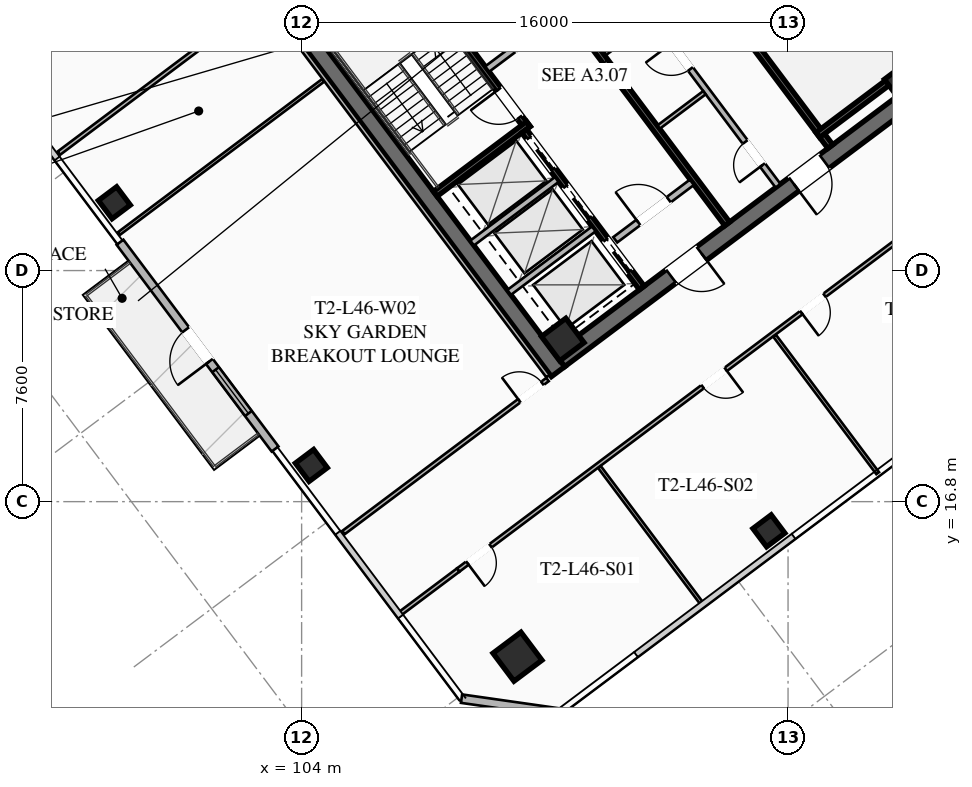
"""IFC4 building model, lengths in metres.
Left out: names, types, materials, properties, quantities, classifications, styles, units other than length and angle.
Written with IfcOpenShell. Run it as: python <this file> out.ifc"""

import sys

from ifc_helpers import new_model, si_unit, direction, frame, frame_2d, origin, origin_2d, place, context, subcontext, project, spatial, rectangle, hollow_rectangle, extrude, element, fill, save


model = new_model("IFC4")
c1 = context("Model", 3, precision=1e-05, world=origin(), true_north=direction((0.0, 1.0)))
c2 = subcontext(c1, "Body", "Model", "MODEL_VIEW")
j1 = project(units=[si_unit("LENGTHUNIT", "METRE"), si_unit("PLANEANGLEUNIT", "RADIAN")], contexts=[c1])
p1 = place(None, origin())
s1 = spatial("IfcSite", under=j1, at=p1, CompositionType="ELEMENT")
p2 = place(p1, origin())
s2 = spatial("IfcBuilding", under=s1, at=p2, CompositionType="ELEMENT")
p3 = place(p2, frame((0.0, 0.0, 171.2)))
s3 = spatial("IfcBuildingStorey", under=s2, at=p3, CompositionType="ELEMENT", Elevation=171.2)
for number, where, z_axis, x_axis in (
    (1, (112.436, 21.077, 0.0), (0.0, 0.0, 1.0), (-0.6, 0.8, 0.0)),
    (2, (115.564, 42.923, 0.0), (0.0, 0.0, 1.0), (0.6, -0.8, 0.0)),
):
    element("IfcWall", number, at=place(p3, frame(where, z_axis=z_axis, x_axis=x_axis)), inside=s3, PredefinedType="SHEAR", context=c2, shape_type="SweptSolid", body=[
        extrude(rectangle(XDim=15.6, YDim=0.55, at=frame_2d((7.8, 0.0))), origin(), (0.0, 0.0, 1.0), 3.55),
    ])
p4 = place(p3, frame((124.539, 30.498, 0.0), z_axis=(0.0, 0.0, 1.0), x_axis=(-0.799998054672, -0.600002593761, 0.0)))
e3 = element("IfcWall", 3, at=p4, inside=s3, PredefinedType="SHEAR", context=c2, shape_type="SweptSolid", body=[
    extrude(rectangle(XDim=15.06, YDim=0.55, at=frame_2d((7.53, 0.0))), origin(), (0.0, 0.0, 1.0), 3.55),
])
p5 = place(p4, frame((9.23, 0.0, 0.0)))
e4 = element("IfcOpeningElement", 4, at=p5, cuts=e3, PredefinedType="OPENING", context=c2, shape_type="SweptSolid", body=[
    extrude(rectangle(XDim=1.25, YDim=2.25, at=frame_2d((0.625, 1.125))), frame((0.0, 0.285, 0.0), z_axis=(0.0, -1.0, 0.0), x_axis=(1.0, 0.0, 0.0)), (0.0, 0.0, 1.0), 0.57),
])
p6 = place(p4, frame((4.18, 0.0, 0.0)))
e5 = element("IfcOpeningElement", 5, at=p6, cuts=e3, PredefinedType="OPENING", context=c2, shape_type="SweptSolid", body=[
    extrude(rectangle(XDim=1.25, YDim=2.25, at=frame_2d((0.625, 1.125))), frame((0.0, 0.285, 0.0), z_axis=(0.0, -1.0, 0.0), x_axis=(1.0, 0.0, 0.0)), (0.0, 0.0, 1.0), 0.57),
])
for number, where, z_axis, x_axis in (
    (6, (112.59, 22.13, 0.0), (0.0, 0.0, 1.0), (0.8, 0.6, 0.0)),
    (7, (123.87, 30.59, 0.0), (0.0, 0.0, 1.0), (0.8, 0.6, 0.0)),
):
    element("IfcColumn", number, at=place(p3, frame(where, z_axis=z_axis, x_axis=x_axis)), inside=s3, PredefinedType="COLUMN", context=c2, shape_type="SweptSolid", body=[
        extrude(hollow_rectangle(XDim=1.0, YDim=1.0, WallThickness=0.04, at=origin_2d()), origin(), (0.0, 0.0, 1.0), 3.37),
    ])
p7 = place(p3, frame((111.1, 11.7, 0.0), z_axis=(0.0, 0.0, 1.0), x_axis=(0.799999996291, 0.600000004945, 0.0)))
e8 = element("IfcColumn", 8, at=p7, inside=s3, PredefinedType="COLUMN", context=c2, shape_type="SweptSolid", body=[
    extrude(hollow_rectangle(XDim=1.15, YDim=1.15, WallThickness=0.045, at=origin_2d()), origin(), (0.0, 0.0, 1.0), 3.37),
])
for number, where, z_axis, x_axis in (
    (9, (119.37, 15.84, 0.0), (0.0, 0.0, 1.0), (0.8, 0.6, 0.0)),
    (10, (97.84, 26.63, 0.0), (0.0, 0.0, 1.0), (0.8, 0.6, 0.0)),
    (11, (104.32, 17.99, 0.0), (0.0, 0.0, 1.0), (0.8, 0.6, 0.0)),
):
    element("IfcColumn", number, at=place(p3, frame(where, z_axis=z_axis, x_axis=x_axis)), inside=s3, PredefinedType="COLUMN", context=c2, shape_type="SweptSolid", body=[
        extrude(hollow_rectangle(XDim=0.75, YDim=0.75, WallThickness=0.032, at=origin_2d()), origin(), (0.0, 0.0, 1.0), 3.37),
    ])
p8 = place(p3, frame((103.126, 18.532, 0.0), z_axis=(0.0, 0.0, 1.0), x_axis=(-0.600004595526, 0.799996553335, 0.0)))
e12 = element("IfcWall", 12, at=p8, inside=s3, PredefinedType="SOLIDWALL", context=c2, shape_type="SweptSolid", body=[
    extrude(rectangle(XDim=8.5, YDim=0.28, at=frame_2d((4.25, 0.0))), origin(), (0.0, 0.0, 1.0), 3.37),
])
p9 = place(p8, frame((3.6, 0.0, 0.0)))
e13 = element("IfcOpeningElement", 13, at=p9, cuts=e12, PredefinedType="OPENING", context=c2, shape_type="SweptSolid", body=[
    extrude(rectangle(XDim=1.3, YDim=2.15, at=frame_2d((0.65, 1.075))), frame((0.0, 0.15, 0.0), z_axis=(0.0, -1.0, 0.0), x_axis=(1.0, 0.0, 0.0)), (0.0, 0.0, 1.0), 0.3),
])
p10 = place(p8, frame((1.46, 0.0, 0.85)))
e14 = element("IfcOpeningElement", 14, at=p10, cuts=e12, PredefinedType="OPENING", context=c2, shape_type="SweptSolid", body=[
    extrude(rectangle(XDim=1.8, YDim=1.92, at=frame_2d((0.9, 0.96))), frame((0.0, 0.15, 0.0), z_axis=(0.0, -1.0, 0.0), x_axis=(1.0, 0.0, 0.0)), (0.0, 0.0, 1.0), 0.3),
])
p11 = place(p3, frame((112.48, 9.86, 0.0), z_axis=(0.0, 0.0, 1.0), x_axis=(-0.989950994782, 0.141410847992, 0.0)))
e15 = element("IfcWall", 15, at=p11, inside=s3, PredefinedType="SOLIDWALL", context=c2, shape_type="SweptSolid", body=[
    extrude(rectangle(XDim=3.253, YDim=0.28, at=frame_2d((1.626, 0.0))), origin(), (0.0, 0.0, 1.0), 3.37),
])
p12 = place(p3, frame((111.44, 29.08, 0.0), z_axis=(0.0, 0.0, 1.0), x_axis=(-0.59999029481, 0.8000072788, 0.0)))
e16 = element("IfcWall", 16, at=p12, inside=s3, PredefinedType="SHEAR", context=c2, shape_type="SweptSolid", body=[
    extrude(rectangle(XDim=8.05, YDim=0.2, at=frame_2d((4.025, 0.0))), origin(), (0.0, 0.0, 1.0), 3.37),
])
p13 = place(p12, frame((0.45, 0.0, 0.0)))
e17 = element("IfcOpeningElement", 17, at=p13, cuts=e16, PredefinedType="OPENING", context=c2, shape_type="SweptSolid", body=[
    extrude(rectangle(XDim=1.15, YDim=2.2, at=frame_2d((0.575, 1.1))), frame((0.0, 0.11, 0.0), z_axis=(0.0, -1.0, 0.0), x_axis=(1.0, 0.0, 0.0)), (0.0, 0.0, 1.0), 0.22),
])
p14 = place(p3, frame((108.396, 26.922, 0.0), z_axis=(0.0, 0.0, 1.0), x_axis=(0.800015298837, 0.599979601008, 0.0)))
e18 = element("IfcWall", 18, at=p14, inside=s3, PredefinedType="SHEAR", context=c2, shape_type="SweptSolid", body=[
    extrude(rectangle(XDim=3.83, YDim=0.2, at=frame_2d((1.915, 0.0))), origin(), (0.0, 0.0, 1.0), 3.37),
])
p15 = place(p3, frame((116.56, 34.92, 0.0), z_axis=(0.0, 0.0, 1.0), x_axis=(0.59999029481, -0.8000072788, 0.0)))
e19 = element("IfcWall", 19, at=p15, inside=s3, PredefinedType="SHEAR", context=c2, shape_type="SweptSolid", body=[
    extrude(rectangle(XDim=8.05, YDim=0.2, at=frame_2d((4.025, 0.0))), origin(), (0.0, 0.0, 1.0), 3.37),
])
p16 = place(p15, frame((0.45, 0.0, 0.0)))
e20 = element("IfcOpeningElement", 20, at=p16, cuts=e19, PredefinedType="OPENING", context=c2, shape_type="SweptSolid", body=[
    extrude(rectangle(XDim=1.15, YDim=2.2, at=frame_2d((0.575, 1.1))), frame((0.0, 0.11, 0.0), z_axis=(0.0, -1.0, 0.0), x_axis=(1.0, 0.0, 0.0)), (0.0, 0.0, 1.0), 0.22),
])
p17 = place(p3, frame((120.98, 28.86, 0.0), z_axis=(0.0, 0.0, 1.0), x_axis=(0.800015298837, 0.599979601008, 0.0)))
e21 = element("IfcWall", 21, at=p17, inside=s3, PredefinedType="SHEAR", context=c2, shape_type="SweptSolid", body=[
    extrude(rectangle(XDim=3.83, YDim=0.2, at=frame_2d((1.915, 0.0))), origin(), (0.0, 0.0, 1.0), 3.37),
])
p18 = place(p3, frame((117.998, 25.936, 0.0), z_axis=(0.0, 0.0, 1.0), x_axis=(-0.600002693989, 0.799997979501, 0.0)))
e22 = element("IfcWall", 22, at=p18, inside=s3, PredefinedType="SHEAR", context=c2, shape_type="SweptSolid", body=[
    extrude(rectangle(XDim=14.5, YDim=0.2, at=frame_2d((7.25, 0.0))), origin(), (0.0, 0.0, 1.0), 3.37),
])
p19 = place(p3, frame((110.104, 31.028, 0.0), z_axis=(0.0, 0.0, 1.0), x_axis=(0.800018601094, 0.59997519774, 0.0)))
e23 = element("IfcWall", 23, at=p19, inside=s3, PredefinedType="SOLIDWALL", context=c2, shape_type="SweptSolid", body=[
    extrude(rectangle(XDim=3.15, YDim=0.22, at=frame_2d((1.575, 0.0))), origin(), (0.0, 0.0, 1.0), 2.723),
])
p20 = place(p19, frame((1.1, 0.0, 0.0)))
e24 = element("IfcOpeningElement", 24, at=p20, cuts=e23, PredefinedType="OPENING", context=c2, shape_type="SweptSolid", body=[
    extrude(rectangle(XDim=0.95, YDim=2.05, at=frame_2d((0.475, 1.025))), frame((0.0, 0.12, 0.0), z_axis=(0.0, -1.0, 0.0), x_axis=(1.0, 0.0, 0.0)), (0.0, 0.0, 1.0), 0.24),
])
p21 = place(p3, frame((114.316, 25.412, 0.0), z_axis=(0.0, 0.0, 1.0), x_axis=(0.800018601094, 0.59997519774, 0.0)))
e25 = element("IfcWall", 25, at=p21, inside=s3, PredefinedType="SOLIDWALL", context=c2, shape_type="SweptSolid", body=[
    extrude(rectangle(XDim=3.15, YDim=0.22, at=frame_2d((1.575, 0.0))), origin(), (0.0, 0.0, 1.0), 2.723),
])
p22 = place(p21, frame((0.95, 0.0, 0.0)))
e26 = element("IfcOpeningElement", 26, at=p22, cuts=e25, PredefinedType="OPENING", context=c2, shape_type="SweptSolid", body=[
    extrude(rectangle(XDim=1.25, YDim=2.25, at=frame_2d((0.625, 1.125))), frame((0.0, 0.12, 0.0), z_axis=(0.0, -1.0, 0.0), x_axis=(1.0, 0.0, 0.0)), (0.0, 0.0, 1.0), 0.24),
])
p23 = place(p3, frame((115.19, 23.83, 0.0), z_axis=(0.0, 0.0, 1.0), x_axis=(-0.599993943644, 0.800004542231, 0.0)))
e27 = element("IfcWall", 27, at=p23, inside=s3, PredefinedType="SHEAR", context=c2, shape_type="SweptSolid", body=[
    extrude(rectangle(XDim=6.45, YDim=0.2, at=frame_2d((3.225, 0.0))), origin(), (0.0, 0.0, 1.0), 3.37),
])
p24 = place(p23, frame((4.875, 0.0, 0.0)))
e28 = element("IfcOpeningElement", 28, at=p24, cuts=e27, PredefinedType="OPENING", context=c2, shape_type="SweptSolid", body=[
    extrude(rectangle(XDim=1.3, YDim=2.25, at=frame_2d((0.65, 1.125))), frame((0.0, 0.11, 0.0), z_axis=(0.0, -1.0, 0.0), x_axis=(1.0, 0.0, 0.0)), (0.0, 0.0, 1.0), 0.22),
])
p25 = place(p23, frame((2.875, 0.0, 0.0)))
e29 = element("IfcOpeningElement", 29, at=p25, cuts=e27, PredefinedType="OPENING", context=c2, shape_type="SweptSolid", body=[
    extrude(rectangle(XDim=1.3, YDim=2.25, at=frame_2d((0.65, 1.125))), frame((0.0, 0.11, 0.0), z_axis=(0.0, -1.0, 0.0), x_axis=(1.0, 0.0, 0.0)), (0.0, 0.0, 1.0), 0.22),
])
p26 = place(p23, frame((0.675, 0.0, 0.0)))
e30 = element("IfcOpeningElement", 30, at=p26, cuts=e27, PredefinedType="OPENING", context=c2, shape_type="SweptSolid", body=[
    extrude(rectangle(XDim=1.3, YDim=2.25, at=frame_2d((0.65, 1.125))), frame((0.0, 0.11, 0.0), z_axis=(0.0, -1.0, 0.0), x_axis=(1.0, 0.0, 0.0)), (0.0, 0.0, 1.0), 0.22),
])
for number, where, z_axis, x_axis in (
    (31, (110.826, 23.682, 0.0), (0.0, 0.0, 1.0), (0.8, 0.6, 0.0)),
    (32, (109.608, 25.306, 0.0), (0.0, 0.0, 1.0), (0.8, 0.6, 0.0)),
):
    element("IfcWall", number, at=place(p3, frame(where, z_axis=z_axis, x_axis=x_axis)), inside=s3, PredefinedType="SOLIDWALL", context=c2, shape_type="SweptSolid", body=[
        extrude(rectangle(XDim=3.48, YDim=0.2, at=frame_2d((1.74, 0.0))), origin(), (0.0, 0.0, 1.0), 3.37),
    ])
p27 = place(p3, frame((119.67, 27.19, 0.0), z_axis=(0.0, 0.0, 1.0), x_axis=(-0.599988677396, 0.800008491828, 0.0)))
e33 = element("IfcWall", 33, at=p27, inside=s3, PredefinedType="SOLIDWALL", context=c2, shape_type="SweptSolid", body=[
    extrude(rectangle(XDim=6.9, YDim=0.2, at=frame_2d((3.45, 0.0))), origin(), (0.0, 0.0, 1.0), 2.723),
])
p28 = place(p27, frame((0.85, 0.0, 0.0)))
e34 = element("IfcOpeningElement", 34, at=p28, cuts=e33, PredefinedType="OPENING", context=c2, shape_type="SweptSolid", body=[
    extrude(rectangle(XDim=0.95, YDim=2.05, at=frame_2d((0.475, 1.025))), frame((0.0, 0.11, 0.0), z_axis=(0.0, -1.0, 0.0), x_axis=(1.0, 0.0, 0.0)), (0.0, 0.0, 1.0), 0.22),
])
p29 = place(p27, frame((4.8, 0.0, 0.0)))
e35 = element("IfcOpeningElement", 35, at=p29, cuts=e33, PredefinedType="OPENING", context=c2, shape_type="SweptSolid", body=[
    extrude(rectangle(XDim=1.05, YDim=2.2, at=frame_2d((0.525, 1.1))), frame((0.0, 0.11, 0.0), z_axis=(0.0, -1.0, 0.0), x_axis=(1.0, 0.0, 0.0)), (0.0, 0.0, 1.0), 0.22),
])
for number, where, z_axis, x_axis in (
    (36, (113.946, 31.522, 0.0), (0.0, 0.0, 1.0), (0.8, 0.6, 0.0)),
    (37, (115.746, 29.122, 0.0), (0.0, 0.0, 1.0), (0.8, 0.6, 0.0)),
):
    element("IfcWall", number, at=place(p3, frame(where, z_axis=z_axis, x_axis=x_axis)), inside=s3, PredefinedType="PARTITIONING", context=c2, shape_type="SweptSolid", body=[
        extrude(rectangle(XDim=1.88, YDim=0.135, at=frame_2d((0.94, 0.0))), origin(), (0.0, 0.0, 1.0), 2.723),
    ])
p30 = place(p3, frame((94.114, 30.548, 0.0), z_axis=(0.0, 0.0, 1.0), x_axis=(0.800012055778, 0.599983925293, 0.0)))
e38 = element("IfcWall", 38, at=p30, inside=s3, PredefinedType="PARTITIONING", context=c2, shape_type="SweptSolid", body=[
    extrude(rectangle(XDim=2.43, YDim=0.135, at=frame_2d((1.215, 0.0))), origin(), (0.0, 0.0, 1.0), 2.723),
])
p31 = place(p3, frame((132.11, 31.77, 0.0), z_axis=(0.0, 0.0, 1.0), x_axis=(-0.800003062365, -0.599995916825, 0.0)))
e39 = element("IfcWall", 39, at=p31, inside=s3, PredefinedType="PARTITIONING", context=c2, shape_type="SweptSolid", body=[
    extrude(rectangle(XDim=28.7, YDim=0.135, at=frame_2d((14.35, 0.0))), origin(), (0.0, 0.0, 1.0), 2.723),
])
p32 = place(p31, frame((27.37, 0.0, 0.0)))
e40 = element("IfcOpeningElement", 40, at=p32, cuts=e39, PredefinedType="OPENING", context=c2, shape_type="SweptSolid", body=[
    extrude(rectangle(XDim=0.95, YDim=2.05, at=frame_2d((0.475, 1.025))), frame((0.0, 0.077, 0.0), z_axis=(0.0, -1.0, 0.0), x_axis=(1.0, 0.0, 0.0)), (0.0, 0.0, 1.0), 0.155),
])
p33 = place(p31, frame((17.698, 0.0, 0.0)))
e41 = element("IfcOpeningElement", 41, at=p33, cuts=e39, PredefinedType="OPENING", context=c2, shape_type="SweptSolid", body=[
    extrude(rectangle(XDim=0.95, YDim=2.05, at=frame_2d((0.475, 1.025))), frame((0.0, 0.077, 0.0), z_axis=(0.0, -1.0, 0.0), x_axis=(1.0, 0.0, 0.0)), (0.0, 0.0, 1.0), 0.155),
])
p34 = place(p31, frame((13.639, 0.0, 0.0)))
e42 = element("IfcOpeningElement", 42, at=p34, cuts=e39, PredefinedType="OPENING", context=c2, shape_type="SweptSolid", body=[
    extrude(rectangle(XDim=0.95, YDim=2.05, at=frame_2d((0.475, 1.025))), frame((0.0, 0.077, 0.0), z_axis=(0.0, -1.0, 0.0), x_axis=(1.0, 0.0, 0.0)), (0.0, 0.0, 1.0), 0.155),
])
p35 = place(p31, frame((0.38, 0.0, 0.0)))
e43 = element("IfcOpeningElement", 43, at=p35, cuts=e39, PredefinedType="OPENING", context=c2, shape_type="SweptSolid", body=[
    extrude(rectangle(XDim=0.95, YDim=2.05, at=frame_2d((0.475, 1.025))), frame((0.0, 0.077, 0.0), z_axis=(0.0, -1.0, 0.0), x_axis=(1.0, 0.0, 0.0)), (0.0, 0.0, 1.0), 0.155),
])
p36 = place(p3, frame((107.206, 13.092, 0.0), z_axis=(0.0, 0.0, 1.0), x_axis=(0.799975885537, 0.600032151272, 0.0)))
e44 = element("IfcWall", 44, at=p36, inside=s3, PredefinedType="PARTITIONING", context=c2, shape_type="SweptSolid", body=[
    extrude(rectangle(XDim=2.43, YDim=0.135, at=frame_2d((1.215, 0.0))), origin(), (0.0, 0.0, 1.0), 2.723),
])
for number, where, z_axis, x_axis in (
    (45, (117.188, 13.416, 0.0), (0.0, 0.0, 1.0), (-0.6, 0.8, 0.0)),
    (46, (122.948, 17.736, 0.0), (0.0, 0.0, 1.0), (-0.6, 0.8, 0.0)),
):
    element("IfcWall", number, at=place(p3, frame(where, z_axis=z_axis, x_axis=x_axis)), inside=s3, PredefinedType="PARTITIONING", context=c2, shape_type="SweptSolid", body=[
        extrude(rectangle(XDim=5.65, YDim=0.11, at=frame_2d((2.825, 0.0))), origin(), (0.0, 0.0, 1.0), 2.723),
    ])
p37 = place(p3, frame((112.104, 20.928, 0.0), z_axis=(0.0, 0.0, 1.0), x_axis=(-0.599994940075, 0.800003794918, 0.0)))
e47 = element("IfcWall", 47, at=p37, inside=s3, PredefinedType="PARTITIONING", context=c2, shape_type="SweptSolid", body=[
    extrude(rectangle(XDim=15.44, YDim=0.135, at=frame_2d((7.72, 0.0))), origin(), (0.0, 0.0, 1.0), 2.723),
])
p38 = place(p3, frame((102.728, 33.296, 0.0), z_axis=(0.0, 0.0, 1.0), x_axis=(-0.8, -0.6, 0.0)))
e48 = element("IfcWall", 48, at=p38, inside=s3, PredefinedType="PARTITIONING", context=c2, shape_type="SweptSolid", body=[
    extrude(rectangle(XDim=8.39, YDim=0.135, at=frame_2d((4.195, 0.0))), origin(), (0.0, 0.0, 1.0), 2.723),
])
p39 = place(p38, frame((0.5, 0.0, 0.0)))
e49 = element("IfcOpeningElement", 49, at=p39, cuts=e48, PredefinedType="OPENING", context=c2, shape_type="SweptSolid", body=[
    extrude(rectangle(XDim=0.95, YDim=2.05, at=frame_2d((0.475, 1.025))), frame((0.0, 0.077, 0.0), z_axis=(0.0, -1.0, 0.0), x_axis=(1.0, 0.0, 0.0)), (0.0, 0.0, 1.0), 0.155),
])
p40 = place(p3, frame((105.376, 15.782, 0.0), z_axis=(0.0, 0.0, 1.0), x_axis=(0.8, 0.6, 0.0)))
e50 = element("IfcWall", 50, at=p40, inside=s3, PredefinedType="PARTITIONING", context=c2, shape_type="SweptSolid", body=[
    extrude(rectangle(XDim=8.39, YDim=0.135, at=frame_2d((4.195, 0.0))), origin(), (0.0, 0.0, 1.0), 2.723),
])
p41 = place(p40, frame((7.23, 0.0, 0.0)))
e51 = element("IfcOpeningElement", 51, at=p41, cuts=e50, PredefinedType="OPENING", context=c2, shape_type="SweptSolid", body=[
    extrude(rectangle(XDim=0.95, YDim=2.05, at=frame_2d((0.475, 1.025))), frame((0.0, 0.077, 0.0), z_axis=(0.0, -1.0, 0.0), x_axis=(1.0, 0.0, 0.0)), (0.0, 0.0, 1.0), 0.155),
])
p42 = place(p3, frame((97.996, 25.622, 0.0), z_axis=(0.0, 0.0, 1.0), x_axis=(0.8, 0.6, 0.0)))
e52 = element("IfcWall", 52, at=p42, inside=s3, PredefinedType="PARTITIONING", context=c2, shape_type="SweptSolid", body=[
    extrude(rectangle(XDim=8.39, YDim=0.11, at=frame_2d((4.195, 0.0))), origin(), (0.0, 0.0, 1.0), 2.723),
])
p43 = place(p9, origin())
e53 = element("IfcDoor", 53, at=p43, inside=s3, OperationType="SINGLE_SWING_LEFT", PredefinedType="DOOR", context=c2, shape_type="SweptSolid", body=[
    extrude(rectangle(XDim=1.3, YDim=2.15, at=frame_2d((0.65, 1.075))), frame((0.0, 0.025, 0.0), z_axis=(0.0, -1.0, 0.0), x_axis=(1.0, 0.0, 0.0)), (0.0, 0.0, 1.0), 0.05),
])
fill(e13, e53)
p44 = place(p10, origin())
e54 = element("IfcWindow", 54, at=p44, inside=s3, PartitioningType="SINGLE_PANEL", PredefinedType="WINDOW", context=c2, shape_type="SweptSolid", body=[
    extrude(rectangle(XDim=1.8, YDim=1.92, at=frame_2d((0.9, 0.96))), frame((0.0, 0.03, 0.0), z_axis=(0.0, -1.0, 0.0), x_axis=(1.0, 0.0, 0.0)), (0.0, 0.0, 1.0), 0.06),
])
fill(e14, e54)
p45 = place(p5, origin())
e55 = element("IfcDoor", 55, at=p45, inside=s3, OperationType="SINGLE_SWING_LEFT", PredefinedType="DOOR", context=c2, shape_type="SweptSolid", body=[
    extrude(rectangle(XDim=1.25, YDim=2.25, at=frame_2d((0.625, 1.125))), frame((0.0, 0.025, 0.0), z_axis=(0.0, -1.0, 0.0), x_axis=(1.0, 0.0, 0.0)), (0.0, 0.0, 1.0), 0.05),
])
fill(e4, e55)
p46 = place(p6, origin())
e56 = element("IfcDoor", 56, at=p46, inside=s3, OperationType="SINGLE_SWING_RIGHT", PredefinedType="DOOR", context=c2, shape_type="SweptSolid", body=[
    extrude(rectangle(XDim=1.25, YDim=2.25, at=frame_2d((0.625, 1.125))), frame((0.0, 0.025, 0.0), z_axis=(0.0, -1.0, 0.0), x_axis=(1.0, 0.0, 0.0)), (0.0, 0.0, 1.0), 0.05),
])
fill(e5, e56)
p47 = place(p13, origin())
e57 = element("IfcDoor", 57, at=p47, inside=s3, OperationType="SINGLE_SWING_RIGHT", PredefinedType="DOOR", context=c2, shape_type="SweptSolid", body=[
    extrude(rectangle(XDim=1.15, YDim=2.2, at=frame_2d((0.575, 1.1))), frame((0.0, 0.025, 0.0), z_axis=(0.0, -1.0, 0.0), x_axis=(1.0, 0.0, 0.0)), (0.0, 0.0, 1.0), 0.05),
])
fill(e17, e57)
p48 = place(p22, origin())
e58 = element("IfcDoor", 58, at=p48, inside=s3, OperationType="SINGLE_SWING_LEFT", PredefinedType="DOOR", context=c2, shape_type="SweptSolid", body=[
    extrude(rectangle(XDim=1.25, YDim=2.25, at=frame_2d((0.625, 1.125))), frame((0.0, 0.025, 0.0), z_axis=(0.0, -1.0, 0.0), x_axis=(1.0, 0.0, 0.0)), (0.0, 0.0, 1.0), 0.05),
])
fill(e26, e58)
p49 = place(p28, origin())
e59 = element("IfcDoor", 59, at=p49, inside=s3, OperationType="SINGLE_SWING_LEFT", PredefinedType="DOOR", context=c2, shape_type="SweptSolid", body=[
    extrude(rectangle(XDim=0.95, YDim=2.05, at=frame_2d((0.475, 1.025))), frame((0.0, 0.025, 0.0), z_axis=(0.0, -1.0, 0.0), x_axis=(1.0, 0.0, 0.0)), (0.0, 0.0, 1.0), 0.05),
])
fill(e34, e59)
p50 = place(p29, origin())
e60 = element("IfcDoor", 60, at=p50, inside=s3, OperationType="SINGLE_SWING_RIGHT", PredefinedType="DOOR", context=c2, shape_type="SweptSolid", body=[
    extrude(rectangle(XDim=1.05, YDim=2.2, at=frame_2d((0.525, 1.1))), frame((0.0, 0.025, 0.0), z_axis=(0.0, -1.0, 0.0), x_axis=(1.0, 0.0, 0.0)), (0.0, 0.0, 1.0), 0.05),
])
fill(e35, e60)
p51 = place(p32, origin())
e61 = element("IfcDoor", 61, at=p51, inside=s3, OperationType="SINGLE_SWING_RIGHT", PredefinedType="DOOR", context=c2, shape_type="SweptSolid", body=[
    extrude(rectangle(XDim=0.95, YDim=2.05, at=frame_2d((0.475, 1.025))), frame((0.0, 0.025, 0.0), z_axis=(0.0, -1.0, 0.0), x_axis=(1.0, 0.0, 0.0)), (0.0, 0.0, 1.0), 0.05),
])
fill(e40, e61)
p52 = place(p33, origin())
e62 = element("IfcDoor", 62, at=p52, inside=s3, OperationType="SINGLE_SWING_LEFT", PredefinedType="DOOR", context=c2, shape_type="SweptSolid", body=[
    extrude(rectangle(XDim=0.95, YDim=2.05, at=frame_2d((0.475, 1.025))), frame((0.0, 0.025, 0.0), z_axis=(0.0, -1.0, 0.0), x_axis=(1.0, 0.0, 0.0)), (0.0, 0.0, 1.0), 0.05),
])
fill(e41, e62)
p53 = place(p34, origin())
e63 = element("IfcDoor", 63, at=p53, inside=s3, OperationType="SINGLE_SWING_RIGHT", PredefinedType="DOOR", context=c2, shape_type="SweptSolid", body=[
    extrude(rectangle(XDim=0.95, YDim=2.05, at=frame_2d((0.475, 1.025))), frame((0.0, 0.025, 0.0), z_axis=(0.0, -1.0, 0.0), x_axis=(1.0, 0.0, 0.0)), (0.0, 0.0, 1.0), 0.05),
])
fill(e42, e63)
p54 = place(p41, origin())
e64 = element("IfcDoor", 64, at=p54, inside=s3, OperationType="SINGLE_SWING_LEFT", PredefinedType="DOOR", context=c2, shape_type="SweptSolid", body=[
    extrude(rectangle(XDim=0.95, YDim=2.05, at=frame_2d((0.475, 1.025))), frame((0.0, 0.025, 0.0), z_axis=(0.0, -1.0, 0.0), x_axis=(1.0, 0.0, 0.0)), (0.0, 0.0, 1.0), 0.05),
])
fill(e51, e64)
p55 = place(p24, origin())
e65 = element("IfcDoor", 65, at=p55, inside=s3, OperationType="SLIDING_TO_LEFT", PredefinedType="DOOR", context=c2, shape_type="SweptSolid", body=[
    extrude(rectangle(XDim=1.3, YDim=2.25, at=frame_2d((0.65, 1.125))), frame((0.0, 0.025, 0.0), z_axis=(0.0, -1.0, 0.0), x_axis=(1.0, 0.0, 0.0)), (0.0, 0.0, 1.0), 0.05),
])
fill(e28, e65)
p56 = place(p25, origin())
e66 = element("IfcDoor", 66, at=p56, inside=s3, OperationType="SLIDING_TO_LEFT", PredefinedType="DOOR", context=c2, shape_type="SweptSolid", body=[
    extrude(rectangle(XDim=1.3, YDim=2.25, at=frame_2d((0.65, 1.125))), frame((0.0, 0.025, 0.0), z_axis=(0.0, -1.0, 0.0), x_axis=(1.0, 0.0, 0.0)), (0.0, 0.0, 1.0), 0.05),
])
fill(e29, e66)
p57 = place(p26, origin())
e67 = element("IfcDoor", 67, at=p57, inside=s3, OperationType="SLIDING_TO_LEFT", PredefinedType="DOOR", context=c2, shape_type="SweptSolid", body=[
    extrude(rectangle(XDim=1.3, YDim=2.25, at=frame_2d((0.65, 1.125))), frame((0.0, 0.025, 0.0), z_axis=(0.0, -1.0, 0.0), x_axis=(1.0, 0.0, 0.0)), (0.0, 0.0, 1.0), 0.05),
])
fill(e30, e67)
save(model, sys.argv[1])
